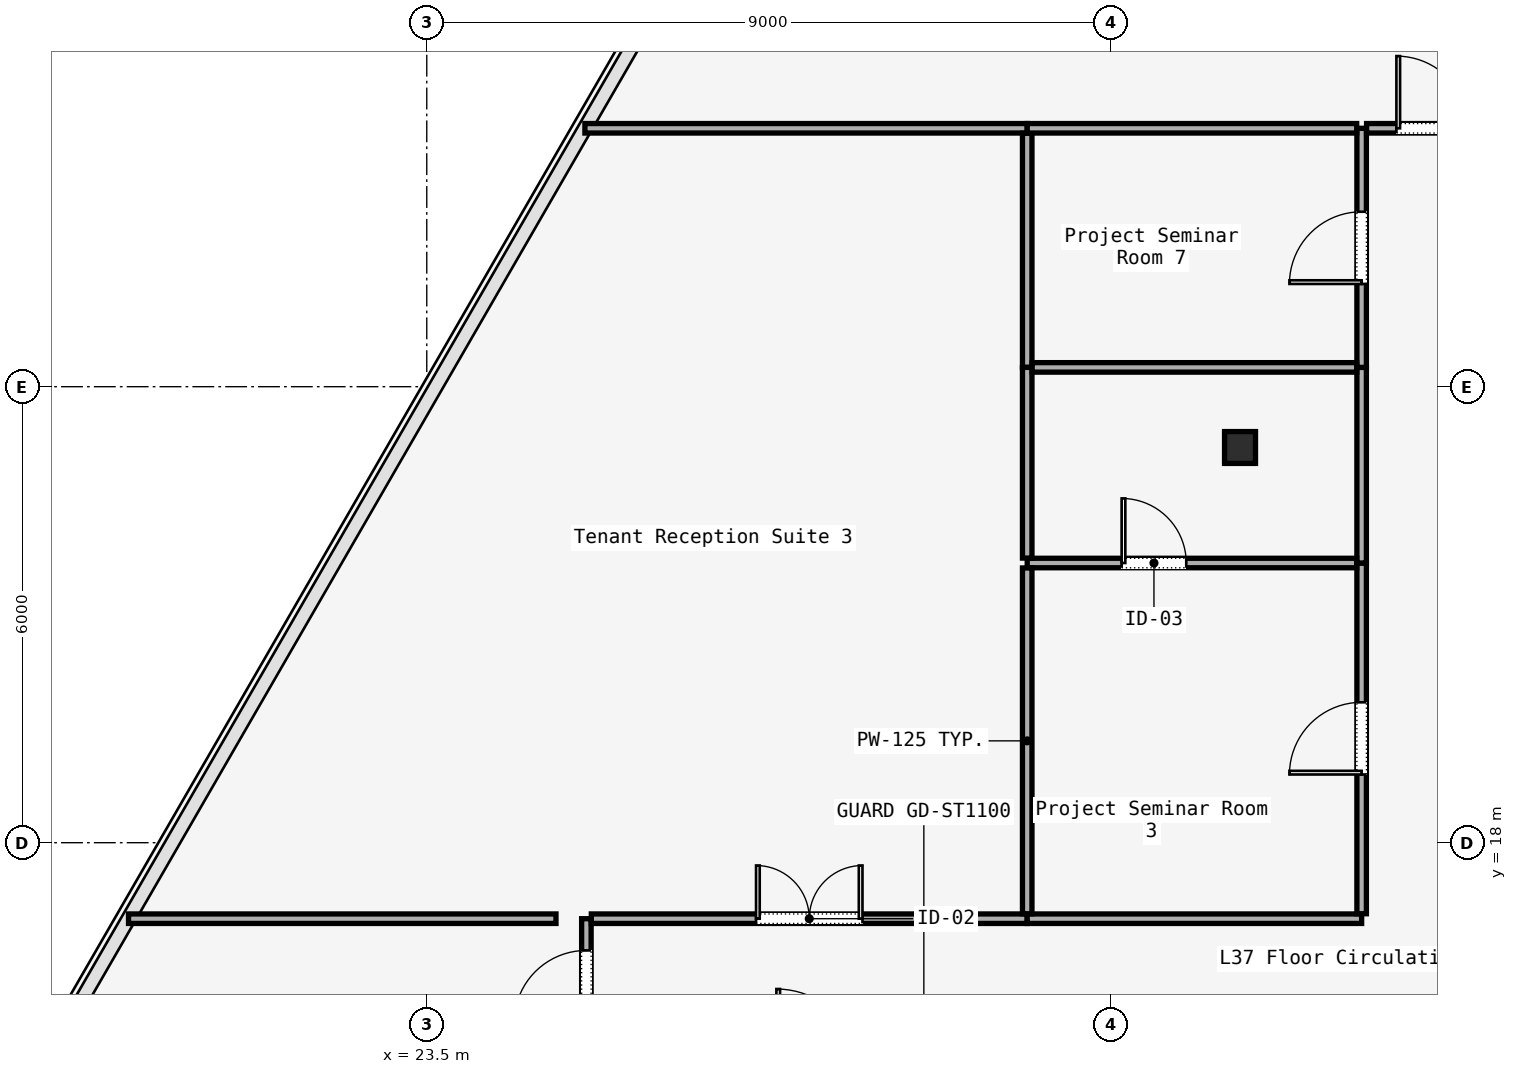
"""IFC4 building model, lengths in metres.
Left out: names, types, materials, properties, quantities, classifications, styles, units other than length and angle.
Written with IfcOpenShell. Run it as: python <this file> out.ifc"""

import sys

from ifc_helpers import new_model, si_unit, direction, frame, frame_2d, origin, origin_2d, place, context, subcontext, project, spatial, rectangle, i_section, extrude, element, fill, save


model = new_model("IFC4")
c1 = context("Model", 3, precision=1e-05, world=origin(), true_north=direction((0.0, 1.0)))
c2 = subcontext(c1, "Body", "Model", "MODEL_VIEW")
j1 = project(units=[si_unit("LENGTHUNIT", "METRE"), si_unit("PLANEANGLEUNIT", "RADIAN")], contexts=[c1])
p1 = place(None, origin())
s1 = spatial("IfcSite", under=j1, at=p1, CompositionType="ELEMENT")
p2 = place(p1, origin())
s2 = spatial("IfcBuilding", under=s1, at=p2, CompositionType="ELEMENT")
p3 = place(p2, frame((0.0, 0.0, 157.4)))
s3 = spatial("IfcBuildingStorey", under=s2, at=p3, CompositionType="ELEMENT", Elevation=157.4)
p4 = place(p3, frame((34.2, 23.2, 0.0), z_axis=(0.0, 0.0, 1.0), x_axis=(1.0, 0.0, 0.0)))
e1 = element("IfcColumn", 1, at=p4, inside=s3, PredefinedType="COLUMN", context=c2, shape_type="SweptSolid", body=[
    extrude(i_section(OverallWidth=0.407, OverallDepth=0.419, WebThickness=0.031, FlangeThickness=0.049, FilletRadius=0.015, at=origin_2d()), origin(), (0.0, 0.0, 1.0), 3.58),
])
p5 = place(p3, frame((25.6, 15.215, 0.0), z_axis=(0.0, 0.0, 1.0), x_axis=(0.0, 1.0, 0.0)))
e2 = element("IfcWall", 2, at=p5, inside=s3, PredefinedType="PARTITIONING", context=c2, shape_type="SweptSolid", body=[
    extrude(rectangle(XDim=1.785, YDim=0.125, at=frame_2d((0.893, 0.0))), origin(), (0.0, 0.0, 1.0), 3.01),
])
p6 = place(p5, frame((0.417, 0.0, 0.0)))
e3 = element("IfcOpeningElement", 3, at=p6, cuts=e2, PredefinedType="OPENING", context=c2, shape_type="SweptSolid", body=[
    extrude(rectangle(XDim=0.95, YDim=2.2, at=frame_2d((0.475, 1.1))), frame((0.0, 0.062, 0.0), z_axis=(0.0, -1.0, 0.0), x_axis=(1.0, 0.0, 0.0)), (0.0, 0.0, 1.0), 0.125),
])
p7 = place(p3, frame((25.665, 17.0, 0.0), z_axis=(0.0, 0.0, 1.0), x_axis=(1.0, 0.0, 0.0)))
e4 = element("IfcWall", 4, at=p7, inside=s3, PredefinedType="PARTITIONING", context=c2, shape_type="SweptSolid", body=[
    extrude(rectangle(XDim=5.735, YDim=0.125, at=frame_2d((2.867, 0.0))), origin(), (0.0, 0.0, 1.0), 3.01),
])
p8 = place(p7, frame((2.167, 0.0, 0.0)))
e5 = element("IfcOpeningElement", 5, at=p8, cuts=e4, PredefinedType="OPENING", context=c2, shape_type="SweptSolid", body=[
    extrude(rectangle(XDim=1.4, YDim=2.2, at=frame_2d((0.7, 1.1))), frame((0.0, 0.062, 0.0), z_axis=(0.0, -1.0, 0.0), x_axis=(1.0, 0.0, 0.0)), (0.0, 0.0, 1.0), 0.125),
])
p9 = place(p3, frame((31.4, 17.0, 0.0), z_axis=(0.0, 0.0, 1.0), x_axis=(1.0, 0.0, 0.0)))
e6 = element("IfcWall", 6, at=p9, inside=s3, PredefinedType="PARTITIONING", context=c2, shape_type="SweptSolid", body=[
    extrude(rectangle(XDim=4.4, YDim=0.125, at=frame_2d((2.2, 0.0))), origin(), (0.0, 0.0, 1.0), 3.01),
])
p10 = place(p3, frame((35.8, 17.065, 0.0), z_axis=(0.0, 0.0, 1.0), x_axis=(0.0, 1.0, 0.0)))
e7 = element("IfcWall", 7, at=p10, inside=s3, PredefinedType="PARTITIONING", context=c2, shape_type="SweptSolid", body=[
    extrude(rectangle(XDim=4.615, YDim=0.125, at=frame_2d((2.308, 0.0))), origin(), (0.0, 0.0, 1.0), 3.01),
])
p11 = place(p10, frame((1.833, 0.0, 0.0)))
e8 = element("IfcOpeningElement", 8, at=p11, cuts=e7, PredefinedType="OPENING", context=c2, shape_type="SweptSolid", body=[
    extrude(rectangle(XDim=0.95, YDim=2.2, at=frame_2d((0.475, 1.1))), frame((0.0, 0.062, 0.0), z_axis=(0.0, -1.0, 0.0), x_axis=(1.0, 0.0, 0.0)), (0.0, 0.0, 1.0), 0.125),
])
p12 = place(p3, frame((35.8, 21.68, 0.0), z_axis=(0.0, 0.0, 1.0), x_axis=(0.0, 1.0, 0.0)))
e9 = element("IfcWall", 9, at=p12, inside=s3, PredefinedType="PARTITIONING", context=c2, shape_type="SweptSolid", body=[
    extrude(rectangle(XDim=2.574, YDim=0.125, at=frame_2d((1.287, 0.0))), origin(), (0.0, 0.0, 1.0), 3.01),
])
p13 = place(p3, frame((35.8, 24.254, 0.0), z_axis=(0.0, 0.0, 1.0), x_axis=(0.0, 1.0, 0.0)))
e10 = element("IfcWall", 10, at=p13, inside=s3, PredefinedType="PARTITIONING", context=c2, shape_type="SweptSolid", body=[
    extrude(rectangle(XDim=3.146, YDim=0.125, at=frame_2d((1.573, 0.0))), origin(), (0.0, 0.0, 1.0), 3.01),
])
p14 = place(p13, frame((1.098, 0.0, 0.0)))
e11 = element("IfcOpeningElement", 11, at=p14, cuts=e10, PredefinedType="OPENING", context=c2, shape_type="SweptSolid", body=[
    extrude(rectangle(XDim=0.95, YDim=2.2, at=frame_2d((0.475, 1.1))), frame((0.0, 0.062, 0.0), z_axis=(0.0, -1.0, 0.0), x_axis=(1.0, 0.0, 0.0)), (0.0, 0.0, 1.0), 0.125),
])
p15 = place(p3, frame((35.865, 27.4, 0.0), z_axis=(0.0, 0.0, 1.0), x_axis=(1.0, 0.0, 0.0)))
e12 = element("IfcWall", 12, at=p15, inside=s3, PredefinedType="PARTITIONING", context=c2, shape_type="SweptSolid", body=[
    extrude(rectangle(XDim=1.735, YDim=0.125, at=frame_2d((0.868, 0.0))), origin(), (0.0, 0.0, 1.0), 3.01),
])
p16 = place(p15, frame((0.393, 0.0, 0.0)))
e13 = element("IfcOpeningElement", 13, at=p16, cuts=e12, PredefinedType="OPENING", context=c2, shape_type="SweptSolid", body=[
    extrude(rectangle(XDim=0.95, YDim=2.2, at=frame_2d((0.475, 1.1))), frame((0.0, 0.062, 0.0), z_axis=(0.0, -1.0, 0.0), x_axis=(1.0, 0.0, 0.0)), (0.0, 0.0, 1.0), 0.125),
])
p17 = place(p3, frame((19.576, 17.0, 0.0), z_axis=(0.0, 0.0, 1.0), x_axis=(1.0, 0.0, 0.0)))
e14 = element("IfcWall", 14, at=p17, inside=s3, PredefinedType="PARTITIONING", context=c2, shape_type="SweptSolid", body=[
    extrude(rectangle(XDim=5.624, YDim=0.125, at=frame_2d((2.812, 0.0))), origin(), (0.0, 0.0, 1.0), 3.01),
])
p18 = place(p3, frame((31.4, 21.68, 0.0), z_axis=(0.0, 0.0, 1.0), x_axis=(1.0, 0.0, 0.0)))
e15 = element("IfcWall", 15, at=p18, inside=s3, PredefinedType="PARTITIONING", context=c2, shape_type="SweptSolid", body=[
    extrude(rectangle(XDim=4.335, YDim=0.125, at=frame_2d((2.167, 0.0))), origin(), (0.0, 0.0, 1.0), 3.01),
])
p19 = place(p18, frame((1.242, 0.0, 0.0)))
e16 = element("IfcOpeningElement", 16, at=p19, cuts=e15, PredefinedType="OPENING", context=c2, shape_type="SweptSolid", body=[
    extrude(rectangle(XDim=0.85, YDim=2.15, at=frame_2d((0.425, 1.075))), frame((0.0, 0.062, 0.0), z_axis=(0.0, -1.0, 0.0), x_axis=(1.0, 0.0, 0.0)), (0.0, 0.0, 1.0), 0.125),
])
p20 = place(p3, frame((31.4, 17.065, 0.0), z_axis=(0.0, 0.0, 1.0), x_axis=(0.0, 1.0, 0.0)))
e17 = element("IfcWall", 17, at=p20, inside=s3, PredefinedType="PARTITIONING", context=c2, shape_type="SweptSolid", body=[
    extrude(rectangle(XDim=4.55, YDim=0.125, at=frame_2d((2.275, 0.0))), origin(), (0.0, 0.0, 1.0), 3.01),
])
p21 = place(p3, frame((25.581, 27.4, 0.0), z_axis=(0.0, 0.0, 1.0), x_axis=(1.0, 0.0, 0.0)))
e18 = element("IfcWall", 18, at=p21, inside=s3, PredefinedType="PARTITIONING", context=c2, shape_type="SweptSolid", body=[
    extrude(rectangle(XDim=5.819, YDim=0.125, at=frame_2d((2.91, 0.0))), origin(), (0.0, 0.0, 1.0), 3.01),
])
p22 = place(p3, frame((31.4, 27.335, 0.0), z_axis=(0.0, 0.0, 1.0), x_axis=(0.0, -1.0, 0.0)))
e19 = element("IfcWall", 19, at=p22, inside=s3, PredefinedType="PARTITIONING", context=c2, shape_type="SweptSolid", body=[
    extrude(rectangle(XDim=3.081, YDim=0.125, at=frame_2d((1.541, 0.0))), origin(), (0.0, 0.0, 1.0), 3.01),
])
p23 = place(p3, frame((31.4, 24.254, 0.0), z_axis=(0.0, 0.0, 1.0), x_axis=(0.0, -1.0, 0.0)))
e20 = element("IfcWall", 20, at=p23, inside=s3, PredefinedType="PARTITIONING", context=c2, shape_type="SweptSolid", body=[
    extrude(rectangle(XDim=2.509, YDim=0.125, at=frame_2d((1.254, 0.0))), origin(), (0.0, 0.0, 1.0), 3.01),
])
p24 = place(p3, frame((31.465, 24.254, 0.0), z_axis=(0.0, 0.0, 1.0), x_axis=(1.0, 0.0, 0.0)))
e21 = element("IfcWall", 21, at=p24, inside=s3, PredefinedType="PARTITIONING", context=c2, shape_type="SweptSolid", body=[
    extrude(rectangle(XDim=4.27, YDim=0.125, at=frame_2d((2.135, 0.0))), origin(), (0.0, 0.0, 1.0), 3.01),
])
p25 = place(p3, frame((31.4, 27.4, 0.0), z_axis=(0.0, 0.0, 1.0), x_axis=(1.0, 0.0, 0.0)))
e22 = element("IfcWall", 22, at=p25, inside=s3, PredefinedType="PARTITIONING", context=c2, shape_type="SweptSolid", body=[
    extrude(rectangle(XDim=4.335, YDim=0.125, at=frame_2d((2.167, 0.0))), origin(), (0.0, 0.0, 1.0), 3.01),
])
p26 = place(p6, origin())
e23 = element("IfcDoor", 23, at=p26, inside=s3, OperationType="SINGLE_SWING_RIGHT", PredefinedType="DOOR", context=c2, shape_type="SweptSolid", body=[
    extrude(rectangle(XDim=0.95, YDim=2.2, at=frame_2d((0.475, 1.1))), frame((0.0, 0.025, 0.0), z_axis=(0.0, -1.0, 0.0), x_axis=(1.0, 0.0, 0.0)), (0.0, 0.0, 1.0), 0.05),
])
fill(e3, e23)
p27 = place(p11, origin())
e24 = element("IfcDoor", 24, at=p27, inside=s3, OperationType="SINGLE_SWING_RIGHT", PredefinedType="DOOR", context=c2, shape_type="SweptSolid", body=[
    extrude(rectangle(XDim=0.95, YDim=2.2, at=frame_2d((0.475, 1.1))), frame((0.0, 0.025, 0.0), z_axis=(0.0, -1.0, 0.0), x_axis=(1.0, 0.0, 0.0)), (0.0, 0.0, 1.0), 0.05),
])
fill(e8, e24)
p28 = place(p8, origin())
e25 = element("IfcDoor", 25, at=p28, inside=s3, OperationType="SINGLE_SWING_RIGHT", PredefinedType="DOOR", context=c2, shape_type="SweptSolid", body=[
    extrude(rectangle(XDim=1.4, YDim=2.2, at=frame_2d((0.7, 1.1))), frame((0.0, 0.025, 0.0), z_axis=(0.0, -1.0, 0.0), x_axis=(1.0, 0.0, 0.0)), (0.0, 0.0, 1.0), 0.05),
])
fill(e5, e25)
p29 = place(p19, origin())
e26 = element("IfcDoor", 26, at=p29, inside=s3, OperationType="SINGLE_SWING_LEFT", PredefinedType="DOOR", context=c2, shape_type="SweptSolid", body=[
    extrude(rectangle(XDim=0.85, YDim=2.15, at=frame_2d((0.425, 1.075))), frame((0.0, 0.025, 0.0), z_axis=(0.0, -1.0, 0.0), x_axis=(1.0, 0.0, 0.0)), (0.0, 0.0, 1.0), 0.05),
])
fill(e16, e26)
p30 = place(p14, origin())
e27 = element("IfcDoor", 27, at=p30, inside=s3, OperationType="SINGLE_SWING_RIGHT", PredefinedType="DOOR", context=c2, shape_type="SweptSolid", body=[
    extrude(rectangle(XDim=0.95, YDim=2.2, at=frame_2d((0.475, 1.1))), frame((0.0, 0.025, 0.0), z_axis=(0.0, -1.0, 0.0), x_axis=(1.0, 0.0, 0.0)), (0.0, 0.0, 1.0), 0.05),
])
fill(e11, e27)
p31 = place(p16, origin())
e28 = element("IfcDoor", 28, at=p31, inside=s3, OperationType="SINGLE_SWING_LEFT", PredefinedType="DOOR", context=c2, shape_type="SweptSolid", body=[
    extrude(rectangle(XDim=0.95, YDim=2.2, at=frame_2d((0.475, 1.1))), frame((0.0, 0.025, 0.0), z_axis=(0.0, -1.0, 0.0), x_axis=(1.0, 0.0, 0.0)), (0.0, 0.0, 1.0), 0.05),
])
fill(e13, e28)
save(model, sys.argv[1])
